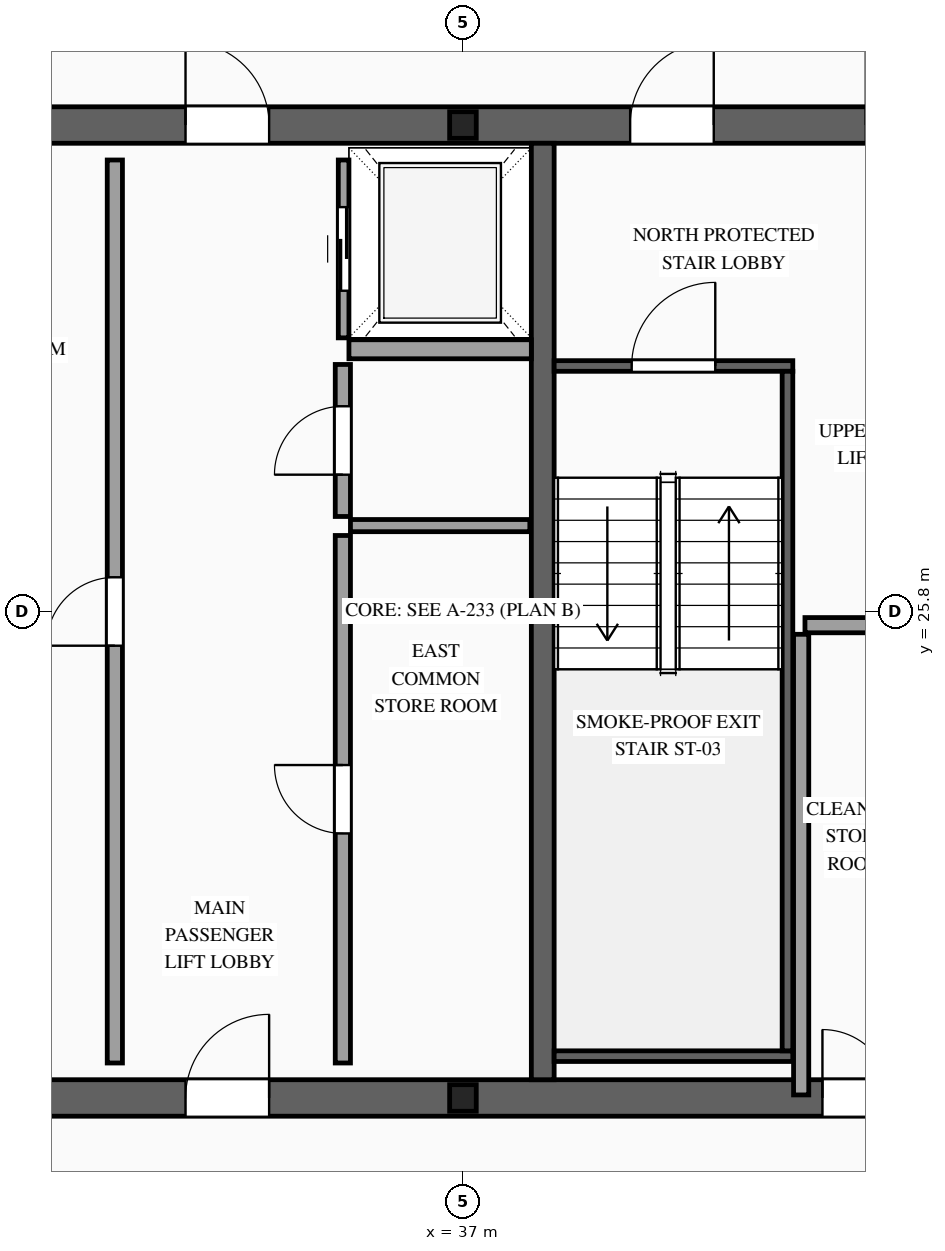
"""IFC4 building model, lengths in metres.
Left out: names, types, materials, properties, quantities, classifications, styles, units other than length and angle.
Written with IfcOpenShell. Run it as: python <this file> out.ifc"""

import sys

from ifc_helpers import new_model, si_unit, direction, frame, frame_2d, origin, origin_2d, place, context, subcontext, project, spatial, rectangle, i_section, extrude, source, transform, mapped, element, fill, save


model = new_model("IFC4")
c1 = context("Model", 3, precision=1e-05, world=origin(), true_north=direction((0.0, 1.0)))
c2 = subcontext(c1, "Body", "Model", "MODEL_VIEW")
j1 = project(units=[si_unit("LENGTHUNIT", "METRE"), si_unit("PLANEANGLEUNIT", "RADIAN")], contexts=[c1])
p1 = place(None, origin())
s1 = spatial("IfcSite", under=j1, at=p1, CompositionType="ELEMENT")
p2 = place(p1, origin())
s2 = spatial("IfcBuilding", under=s1, at=p2, CompositionType="ELEMENT")
p3 = place(p2, frame((0.0, 0.0, 321.7)))
s3 = spatial("IfcBuildingStorey", under=s2, at=p3, CompositionType="ELEMENT", Elevation=321.7)
p4 = place(p3, frame((23.56, 19.4, 0.0), z_axis=(0.0, 0.0, 1.0), x_axis=(1.0, 0.0, 0.0)))
e1 = element("IfcWall", 1, at=p4, inside=s3, PredefinedType="SHEAR", context=c2, shape_type="SweptSolid", body=[
    extrude(rectangle(XDim=26.88, YDim=0.48, at=frame_2d((13.44, 0.0))), origin(), (0.0, 0.0, 1.0), 3.5),
])
p5 = place(p4, frame((1.89, 0.0, 0.0)))
e2 = element("IfcOpeningElement", 2, at=p5, cuts=e1, PredefinedType="OPENING", context=c2, shape_type="SweptSolid", body=[
    extrude(rectangle(XDim=1.1, YDim=2.2, at=frame_2d((0.55, 1.1))), frame((0.0, 0.255, 0.0), z_axis=(0.0, -1.0, 0.0), x_axis=(1.0, 0.0, 0.0)), (0.0, 0.0, 1.0), 0.51),
])
p6 = place(p4, frame((9.79, 0.0, 0.0)))
e3 = element("IfcOpeningElement", 3, at=p6, cuts=e1, PredefinedType="OPENING", context=c2, shape_type="SweptSolid", body=[
    extrude(rectangle(XDim=1.1, YDim=2.2, at=frame_2d((0.55, 1.1))), frame((0.0, 0.255, 0.0), z_axis=(0.0, -1.0, 0.0), x_axis=(1.0, 0.0, 0.0)), (0.0, 0.0, 1.0), 0.51),
])
p7 = place(p4, frame((22.99, 0.0, 0.0)))
e4 = element("IfcOpeningElement", 4, at=p7, cuts=e1, PredefinedType="OPENING", context=c2, shape_type="SweptSolid", body=[
    extrude(rectangle(XDim=1.1, YDim=2.2, at=frame_2d((0.55, 1.1))), frame((0.0, 0.255, 0.0), z_axis=(0.0, -1.0, 0.0), x_axis=(1.0, 0.0, 0.0)), (0.0, 0.0, 1.0), 0.51),
])
p8 = place(p4, frame((19.61, 0.0, 0.0)))
e5 = element("IfcOpeningElement", 5, at=p8, cuts=e1, PredefinedType="OPENING", context=c2, shape_type="SweptSolid", body=[
    extrude(rectangle(XDim=0.9, YDim=2.15, at=frame_2d((0.45, 1.075))), frame((0.0, 0.255, 0.0), z_axis=(0.0, -1.0, 0.0), x_axis=(1.0, 0.0, 0.0)), (0.0, 0.0, 1.0), 0.51),
])
p9 = place(p4, frame((18.17, 0.0, 0.0)))
e6 = element("IfcOpeningElement", 6, at=p9, cuts=e1, PredefinedType="OPENING", context=c2, shape_type="SweptSolid", body=[
    extrude(rectangle(XDim=0.9, YDim=2.15, at=frame_2d((0.45, 1.075))), frame((0.0, 0.255, 0.0), z_axis=(0.0, -1.0, 0.0), x_axis=(1.0, 0.0, 0.0)), (0.0, 0.0, 1.0), 0.51),
])
p10 = place(p3, frame((23.56, 32.2, 0.0), z_axis=(0.0, 0.0, 1.0), x_axis=(1.0, 0.0, 0.0)))
e7 = element("IfcWall", 7, at=p10, inside=s3, PredefinedType="SHEAR", context=c2, shape_type="SweptSolid", body=[
    extrude(rectangle(XDim=26.88, YDim=0.48, at=frame_2d((13.44, 0.0))), origin(), (0.0, 0.0, 1.0), 3.5),
])
p11 = place(p10, frame((4.51, 0.0, 0.0)))
e8 = element("IfcOpeningElement", 8, at=p11, cuts=e7, PredefinedType="OPENING", context=c2, shape_type="SweptSolid", body=[
    extrude(rectangle(XDim=0.9, YDim=2.15, at=frame_2d((0.45, 1.075))), frame((0.0, 0.255, 0.0), z_axis=(0.0, -1.0, 0.0), x_axis=(1.0, 0.0, 0.0)), (0.0, 0.0, 1.0), 0.51),
])
p12 = place(p10, frame((9.79, 0.0, 0.0)))
e9 = element("IfcOpeningElement", 9, at=p12, cuts=e7, PredefinedType="OPENING", context=c2, shape_type="SweptSolid", body=[
    extrude(rectangle(XDim=1.1, YDim=2.2, at=frame_2d((0.55, 1.1))), frame((0.0, 0.255, 0.0), z_axis=(0.0, -1.0, 0.0), x_axis=(1.0, 0.0, 0.0)), (0.0, 0.0, 1.0), 0.51),
])
p13 = place(p10, frame((15.64, 0.0, 0.0)))
e10 = element("IfcOpeningElement", 10, at=p13, cuts=e7, PredefinedType="OPENING", context=c2, shape_type="SweptSolid", body=[
    extrude(rectangle(XDim=1.1, YDim=2.2, at=frame_2d((0.55, 1.1))), frame((0.0, 0.255, 0.0), z_axis=(0.0, -1.0, 0.0), x_axis=(1.0, 0.0, 0.0)), (0.0, 0.0, 1.0), 0.51),
])
p14 = place(p10, frame((18.74, 0.0, 0.0)))
e11 = element("IfcOpeningElement", 11, at=p14, cuts=e7, PredefinedType="OPENING", context=c2, shape_type="SweptSolid", body=[
    extrude(rectangle(XDim=1.1, YDim=2.2, at=frame_2d((0.55, 1.1))), frame((0.0, 0.255, 0.0), z_axis=(0.0, -1.0, 0.0), x_axis=(1.0, 0.0, 0.0)), (0.0, 0.0, 1.0), 0.51),
])
m1 = source(origin(), c2, "Body", "SweptSolid", [
    extrude(rectangle(XDim=12.32, YDim=0.3, at=frame_2d((6.16, 0.0))), origin(), (0.0, 0.0, 1.0), 3.5),
])
p15 = place(p3, frame((38.05, 19.64, 0.0), z_axis=(0.0, 0.0, 1.0), x_axis=(0.0, 1.0, 0.0)))
e12 = element("IfcWall", 12, at=p15, inside=s3, PredefinedType="SOLIDWALL", context=c2, shape_type="MappedRepresentation", body=[
    mapped(m1, transform((0.0, 0.0, 0.0), scale=1.0)),
])
m2 = source(origin(), c2, "Body", "SweptSolid", [
    extrude(i_section(OverallWidth=0.35, OverallDepth=0.35, WebThickness=0.012, FlangeThickness=0.019, at=origin_2d()), origin(), (0.0, 0.0, 1.0), 3.5),
])
for number, where, z_axis, x_axis in (
    (13, (37.0, 19.4, 0.0), (0.0, 0.0, 1.0), (1.0, 0.0, 0.0)),
    (14, (37.0, 32.2, 0.0), (0.0, 0.0, 1.0), (1.0, 0.0, 0.0)),
):
    element("IfcColumn", number, at=place(p3, frame(where, z_axis=z_axis, x_axis=x_axis)), inside=s3, PredefinedType="COLUMN", context=c2, shape_type="MappedRepresentation", body=[
        mapped(m2, transform((0.0, 0.0, 0.0), scale=1.0)),
    ])
p16 = place(p3, frame((35.43, 29.4, 0.0), z_axis=(0.0, 0.0, 1.0), x_axis=(0.0, 1.0, 0.0)))
e15 = element("IfcWall", 15, at=p16, inside=s3, PredefinedType="SOLIDWALL", context=c2, shape_type="SweptSolid", body=[
    extrude(rectangle(XDim=2.34, YDim=0.14, at=frame_2d((1.17, 0.0))), origin(), (0.0, 0.0, 1.0), 3.28),
])
p17 = place(p16, frame((0.62, 0.0, 0.0)))
e16 = element("IfcOpeningElement", 16, at=p17, cuts=e15, PredefinedType="OPENING", context=c2, shape_type="SweptSolid", body=[
    extrude(rectangle(XDim=1.1, YDim=2.2, at=frame_2d((0.55, 1.1))), frame((0.0, 0.085, 0.0), z_axis=(0.0, -1.0, 0.0), x_axis=(1.0, 0.0, 0.0)), (0.0, 0.0, 1.0), 0.17),
])
m3 = source(origin(), c2, "Body", "SweptSolid", [
    extrude(rectangle(XDim=2.4, YDim=0.25, at=frame_2d((1.2, 0.0))), origin(), (0.0, 0.0, 1.0), 3.28),
])
p18 = place(p3, frame((35.5, 29.25, 0.0), z_axis=(0.0, 0.0, 1.0), x_axis=(1.0, 0.0, 0.0)))
e17 = element("IfcWall", 17, at=p18, inside=s3, PredefinedType="SOLIDWALL", context=c2, shape_type="MappedRepresentation", body=[
    mapped(m3, transform((0.0, 0.0, 0.0), scale=1.0)),
])
p19 = place(p3, frame((38.2, 29.03, 0.0), z_axis=(0.0, 0.0, 1.0), x_axis=(1.0, 0.0, 0.0)))
e18 = element("IfcWall", 18, at=p19, inside=s3, PredefinedType="SOLIDWALL", context=c2, shape_type="SweptSolid", body=[
    extrude(rectangle(XDim=3.14, YDim=0.14, at=frame_2d((1.57, 0.0))), origin(), (0.0, 0.0, 1.0), 3.28),
])
p20 = place(p19, frame((1.02, 0.0, 0.0)))
e19 = element("IfcOpeningElement", 19, at=p20, cuts=e18, PredefinedType="OPENING", context=c2, shape_type="SweptSolid", body=[
    extrude(rectangle(XDim=1.1, YDim=2.2, at=frame_2d((0.55, 1.1))), frame((0.0, 0.085, 0.0), z_axis=(0.0, -1.0, 0.0), x_axis=(1.0, 0.0, 0.0)), (0.0, 0.0, 1.0), 0.17),
])
m4 = source(origin(), c2, "Body", "SweptSolid", [
    extrude(rectangle(XDim=3.14, YDim=0.14, at=frame_2d((1.57, 0.0))), origin(), (0.0, 0.0, 1.0), 3.28),
])
p21 = place(p3, frame((38.2, 19.95, 0.0), z_axis=(0.0, 0.0, 1.0), x_axis=(1.0, 0.0, 0.0)))
e20 = element("IfcWall", 20, at=p21, inside=s3, PredefinedType="SOLIDWALL", context=c2, shape_type="MappedRepresentation", body=[
    mapped(m4, transform((0.0, 0.0, 0.0), scale=1.0)),
])
m5 = source(origin(), c2, "Body", "SweptSolid", [
    extrude(rectangle(XDim=8.94, YDim=0.14, at=frame_2d((4.47, 0.0))), origin(), (0.0, 0.0, 1.0), 3.28),
])
p22 = place(p3, frame((41.27, 20.02, 0.0), z_axis=(0.0, 0.0, 1.0), x_axis=(0.0, 1.0, 0.0)))
e21 = element("IfcWall", 21, at=p22, inside=s3, PredefinedType="SOLIDWALL", context=c2, shape_type="MappedRepresentation", body=[
    mapped(m5, transform((0.0, 0.0, 0.0), scale=1.0)),
])
p23 = place(p3, frame((32.42, 19.86, 0.0), z_axis=(0.0, 0.0, 1.0), x_axis=(0.0, 1.0, 0.0)))
e22 = element("IfcWall", 22, at=p23, inside=s3, PredefinedType="PARTITIONING", context=c2, shape_type="SweptSolid", body=[
    extrude(rectangle(XDim=11.88, YDim=0.2, at=frame_2d((5.94, 0.0))), origin(), (0.0, 0.0, 1.0), 3.28),
])
p24 = place(p23, frame((5.49, 0.0, 0.0)))
e23 = element("IfcOpeningElement", 23, at=p24, cuts=e22, PredefinedType="OPENING", context=c2, shape_type="SweptSolid", body=[
    extrude(rectangle(XDim=0.9, YDim=2.15, at=frame_2d((0.45, 1.075))), frame((0.0, 0.115, 0.0), z_axis=(0.0, -1.0, 0.0), x_axis=(1.0, 0.0, 0.0)), (0.0, 0.0, 1.0), 0.23),
])
p25 = place(p3, frame((35.42, 19.86, 0.0), z_axis=(0.0, 0.0, 1.0), x_axis=(0.0, 1.0, 0.0)))
e24 = element("IfcWall", 24, at=p25, inside=s3, PredefinedType="PARTITIONING", context=c2, shape_type="SweptSolid", body=[
    extrude(rectangle(XDim=6.94, YDim=0.2, at=frame_2d((3.47, 0.0))), origin(), (0.0, 0.0, 1.0), 3.28),
])
p26 = place(p25, frame((3.02, 0.0, 0.0)))
e25 = element("IfcOpeningElement", 25, at=p26, cuts=e24, PredefinedType="OPENING", context=c2, shape_type="SweptSolid", body=[
    extrude(rectangle(XDim=0.9, YDim=2.15, at=frame_2d((0.45, 1.075))), frame((0.0, 0.115, 0.0), z_axis=(0.0, -1.0, 0.0), x_axis=(1.0, 0.0, 0.0)), (0.0, 0.0, 1.0), 0.23),
])
p27 = place(p3, frame((35.42, 27.05, 0.0), z_axis=(0.0, 0.0, 1.0), x_axis=(0.0, 1.0, 0.0)))
e26 = element("IfcWall", 26, at=p27, inside=s3, PredefinedType="PARTITIONING", context=c2, shape_type="SweptSolid", body=[
    extrude(rectangle(XDim=2.0, YDim=0.2, at=frame_2d((1.0, 0.0))), origin(), (0.0, 0.0, 1.0), 3.28),
])
p28 = place(p27, frame((0.55, 0.0, 0.0)))
e27 = element("IfcOpeningElement", 27, at=p28, cuts=e26, PredefinedType="OPENING", context=c2, shape_type="SweptSolid", body=[
    extrude(rectangle(XDim=0.9, YDim=2.15, at=frame_2d((0.45, 1.075))), frame((0.0, 0.115, 0.0), z_axis=(0.0, -1.0, 0.0), x_axis=(1.0, 0.0, 0.0)), (0.0, 0.0, 1.0), 0.23),
])
m6 = source(origin(), c2, "Body", "SweptSolid", [
    extrude(rectangle(XDim=2.36, YDim=0.16, at=frame_2d((1.18, 0.0))), origin(), (0.0, 0.0, 1.0), 3.28),
])
p29 = place(p3, frame((35.52, 26.93, 0.0), z_axis=(0.0, 0.0, 1.0), x_axis=(1.0, 0.0, 0.0)))
e28 = element("IfcWall", 28, at=p29, inside=s3, PredefinedType="PARTITIONING", context=c2, shape_type="MappedRepresentation", body=[
    mapped(m6, transform((0.0, 0.0, 0.0), scale=1.0)),
])
m7 = source(origin(), c2, "Body", "SweptSolid", [
    extrude(rectangle(XDim=6.06, YDim=0.2, at=frame_2d((3.03, 0.0))), origin(), (0.0, 0.0, 1.0), 3.28),
])
p30 = place(p3, frame((41.45, 19.44, 0.0), z_axis=(0.0, 0.0, 1.0), x_axis=(0.0, 1.0, 0.0)))
e29 = element("IfcWall", 29, at=p30, inside=s3, PredefinedType="PARTITIONING", context=c2, shape_type="MappedRepresentation", body=[
    mapped(m7, transform((0.0, 0.0, 0.0), scale=1.0)),
])
m8 = source(origin(), c2, "Body", "SweptSolid", [
    extrude(rectangle(XDim=1.35, YDim=0.2, at=frame_2d((0.675, 0.0))), origin(), (0.0, 0.0, 1.0), 3.28),
])
p31 = place(p3, frame((41.5, 25.62, 0.0), z_axis=(0.0, 0.0, 1.0), x_axis=(1.0, 0.0, 0.0)))
e30 = element("IfcWall", 30, at=p31, inside=s3, PredefinedType="PARTITIONING", context=c2, shape_type="MappedRepresentation", body=[
    mapped(m8, transform((0.0, 0.0, 0.0), scale=1.0)),
])
m9 = source(origin(), c2, "Body", "SweptSolid", [
    extrude(rectangle(XDim=1.1, YDim=2.2, at=frame_2d((0.55, 1.1))), frame((0.0, 0.025, 0.0), z_axis=(0.0, -1.0, 0.0), x_axis=(1.0, 0.0, 0.0)), (0.0, 0.0, 1.0), 0.05),
])
p32 = place(p17, origin())
e31 = element("IfcDoor", 31, at=p32, inside=s3, OperationType="SLIDING_TO_RIGHT", PredefinedType="DOOR", context=c2, shape_type="MappedRepresentation", body=[
    mapped(m9, transform((0.0, 0.0, 0.0), scale=1.0)),
])
fill(e16, e31)
m10 = source(origin(), c2, "Body", "SweptSolid", [
    extrude(rectangle(XDim=1.1, YDim=2.2, at=frame_2d((0.55, 1.1))), frame((0.0, 0.025, 0.0), z_axis=(0.0, -1.0, 0.0), x_axis=(1.0, 0.0, 0.0)), (0.0, 0.0, 1.0), 0.05),
])
p33 = place(p20, origin())
e32 = element("IfcDoor", 32, at=p33, inside=s3, OperationType="SINGLE_SWING_RIGHT", PredefinedType="DOOR", context=c2, shape_type="MappedRepresentation", body=[
    mapped(m10, transform((0.0, 0.0, 0.0), scale=1.0)),
])
fill(e19, e32)
p34 = place(p6, origin())
e33 = element("IfcDoor", 33, at=p34, inside=s3, OperationType="SINGLE_SWING_RIGHT", PredefinedType="DOOR", context=c2, shape_type="MappedRepresentation", body=[
    mapped(m10, transform((0.0, 0.0, 0.0), scale=1.0)),
])
fill(e3, e33)
p35 = place(p12, origin())
e34 = element("IfcDoor", 34, at=p35, inside=s3, OperationType="SINGLE_SWING_LEFT", PredefinedType="DOOR", context=c2, shape_type="MappedRepresentation", body=[
    mapped(m10, transform((0.0, 0.0, 0.0), scale=1.0)),
])
fill(e9, e34)
p36 = place(p13, origin())
e35 = element("IfcDoor", 35, at=p36, inside=s3, OperationType="SINGLE_SWING_RIGHT", PredefinedType="DOOR", context=c2, shape_type="MappedRepresentation", body=[
    mapped(m10, transform((0.0, 0.0, 0.0), scale=1.0)),
])
fill(e10, e35)
m11 = source(origin(), c2, "Body", "SweptSolid", [
    extrude(rectangle(XDim=0.9, YDim=2.15, at=frame_2d((0.45, 1.075))), frame((0.0, 0.025, 0.0), z_axis=(0.0, -1.0, 0.0), x_axis=(1.0, 0.0, 0.0)), (0.0, 0.0, 1.0), 0.05),
])
p37 = place(p24, origin())
e36 = element("IfcDoor", 36, at=p37, inside=s3, OperationType="SINGLE_SWING_LEFT", PredefinedType="DOOR", context=c2, shape_type="MappedRepresentation", body=[
    mapped(m11, transform((0.0, 0.0, 0.0), scale=1.0)),
])
fill(e23, e36)
p38 = place(p26, origin())
e37 = element("IfcDoor", 37, at=p38, inside=s3, OperationType="SINGLE_SWING_RIGHT", PredefinedType="DOOR", context=c2, shape_type="MappedRepresentation", body=[
    mapped(m11, transform((0.0, 0.0, 0.0), scale=1.0)),
])
fill(e25, e37)
p39 = place(p28, origin())
e38 = element("IfcDoor", 38, at=p39, inside=s3, OperationType="SINGLE_SWING_LEFT", PredefinedType="DOOR", context=c2, shape_type="MappedRepresentation", body=[
    mapped(m11, transform((0.0, 0.0, 0.0), scale=1.0)),
])
fill(e27, e38)
p40 = place(p9, origin())
e39 = element("IfcDoor", 39, at=p40, inside=s3, OperationType="SINGLE_SWING_LEFT", PredefinedType="DOOR", context=c2, shape_type="MappedRepresentation", body=[
    mapped(m11, transform((0.0, 0.0, 0.0), scale=1.0)),
])
fill(e6, e39)
save(model, sys.argv[1])
